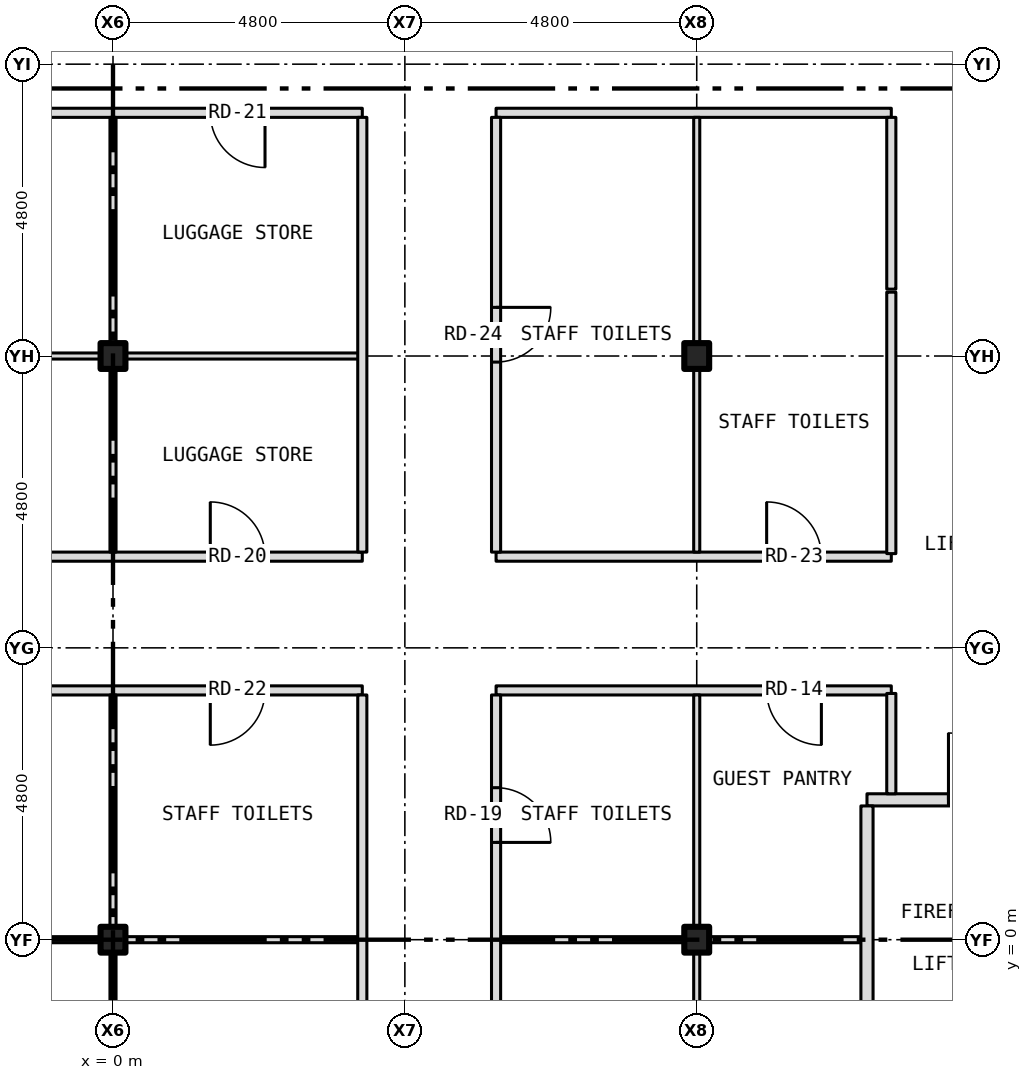
"""IFC4 building model, lengths in metres.
Left out: names, types, materials, properties, quantities, classifications, styles, units other than length and angle.
Written with IfcOpenShell. Run it as: python <this file> out.ifc"""

import sys

from ifc_helpers import new_model, si_unit, direction, frame, frame_2d, origin, origin_2d, place, context, subcontext, project, spatial, rectangle, i_section, extrude, element, fill, save


model = new_model("IFC4")
c1 = context("Model", 3, precision=1e-05, world=origin(), true_north=direction((0.0, 1.0)))
c2 = subcontext(c1, "Body", "Model", "MODEL_VIEW")
j1 = project(units=[si_unit("LENGTHUNIT", "METRE"), si_unit("PLANEANGLEUNIT", "RADIAN")], contexts=[c1])
p1 = place(None, origin())
s1 = spatial("IfcSite", under=j1, at=p1, CompositionType="ELEMENT")
p2 = place(p1, origin())
s2 = spatial("IfcBuilding", under=s1, at=p2, CompositionType="ELEMENT")
p3 = place(p2, frame((0.0, 0.0, 53.0)))
s3 = spatial("IfcBuildingStorey", under=s2, at=p3, CompositionType="ELEMENT", Elevation=53.0)
for number, where, z_axis, x_axis in (
    (1, (0.0, 0.0, -0.15), (0.0, 0.0, 1.0), (1.0, 0.0, 0.0)),
    (2, (0.0, 9.6, -0.15), (0.0, 0.0, 1.0), (1.0, 0.0, 0.0)),
    (3, (9.6, 0.0, -0.15), (0.0, 0.0, 1.0), (1.0, 0.0, 0.0)),
    (4, (9.6, 9.6, -0.15), (0.0, 0.0, 1.0), (1.0, 0.0, 0.0)),
):
    element("IfcColumn", number, at=place(p3, frame(where, z_axis=z_axis, x_axis=x_axis)), inside=s3, PredefinedType="COLUMN", context=c2, shape_type="SweptSolid", body=[
        extrude(i_section(OverallWidth=0.409, OverallDepth=0.424, WebThickness=0.033, FlangeThickness=0.052, at=origin_2d()), origin(), (0.0, 0.0, 1.0), 3.5),
    ])
p4 = place(p3, frame((-9.396, 0.0, 0.0), z_axis=(0.0, 0.0, 1.0), x_axis=(1.0, 0.0, 0.0)))
e5 = element("IfcWall", 5, at=p4, inside=s3, PredefinedType="PARTITIONING", context=c2, shape_type="SweptSolid", body=[
    extrude(rectangle(XDim=9.192, YDim=0.1, at=frame_2d((4.596, 0.0))), origin(), (0.0, 0.0, 1.0), 2.728),
])
p5 = place(p3, frame((-0.204, 0.0, 0.0), z_axis=(0.0, 0.0, 1.0), x_axis=(1.0, 0.0, 0.0)))
e6 = element("IfcWall", 6, at=p5, inside=s3, PredefinedType="PARTITIONING", context=c2, shape_type="SweptSolid", body=[
    extrude(rectangle(XDim=0.408, YDim=0.1, at=frame_2d((0.204, 0.0))), origin(), (0.0, 0.0, 1.0), 3.35),
])
p6 = place(p3, frame((0.204, 0.0, 0.0), z_axis=(0.0, 0.0, 1.0), x_axis=(1.0, 0.0, 0.0)))
e7 = element("IfcWall", 7, at=p6, inside=s3, PredefinedType="PARTITIONING", context=c2, shape_type="SweptSolid", body=[
    extrude(rectangle(XDim=3.896, YDim=0.1, at=frame_2d((1.948, 0.0))), origin(), (0.0, 0.0, 1.0), 2.728),
])
p7 = place(p3, frame((6.3, 0.0, 0.0), z_axis=(0.0, 0.0, 1.0), x_axis=(1.0, 0.0, 0.0)))
e8 = element("IfcWall", 8, at=p7, inside=s3, PredefinedType="PARTITIONING", context=c2, shape_type="SweptSolid", body=[
    extrude(rectangle(XDim=3.096, YDim=0.1, at=frame_2d((1.548, 0.0))), origin(), (0.0, 0.0, 1.0), 2.728),
])
p8 = place(p3, frame((9.396, 0.0, 0.0), z_axis=(0.0, 0.0, 1.0), x_axis=(1.0, 0.0, 0.0)))
e9 = element("IfcWall", 9, at=p8, inside=s3, PredefinedType="PARTITIONING", context=c2, shape_type="SweptSolid", body=[
    extrude(rectangle(XDim=0.408, YDim=0.1, at=frame_2d((0.204, 0.0))), origin(), (0.0, 0.0, 1.0), 3.35),
])
p9 = place(p3, frame((9.804, 0.0, 0.0), z_axis=(0.0, 0.0, 1.0), x_axis=(1.0, 0.0, 0.0)))
e10 = element("IfcWall", 10, at=p9, inside=s3, PredefinedType="PARTITIONING", context=c2, shape_type="SweptSolid", body=[
    extrude(rectangle(XDim=2.596, YDim=0.1, at=frame_2d((1.298, 0.0))), origin(), (0.0, 0.0, 1.0), 2.728),
])
p10 = place(p3, frame((12.4, 2.3, 0.0), z_axis=(0.0, 0.0, 1.0), x_axis=(1.0, 0.0, 0.0)))
e11 = element("IfcWall", 11, at=p10, inside=s3, PredefinedType="PARTITIONING", context=c2, shape_type="SweptSolid", body=[
    extrude(rectangle(XDim=3.28, YDim=0.2, at=frame_2d((1.64, 0.0))), origin(), (0.0, 0.0, 1.0), 3.35),
])
p11 = place(p10, frame((1.34, 0.0, 0.0)))
e12 = element("IfcOpeningElement", 12, at=p11, cuts=e11, PredefinedType="OPENING", context=c2, shape_type="SweptSolid", body=[
    extrude(rectangle(XDim=1.1, YDim=2.1, at=frame_2d((0.55, 1.05))), frame((0.0, 0.112, 0.0), z_axis=(0.0, -1.0, 0.0), x_axis=(1.0, 0.0, 0.0)), (0.0, 0.0, 1.0), 0.224),
])
p12 = place(p3, frame((-12.8, 4.1, 0.0), z_axis=(0.0, 0.0, 1.0), x_axis=(1.0, 0.0, 0.0)))
e13 = element("IfcWall", 13, at=p12, inside=s3, PredefinedType="PARTITIONING", context=c2, shape_type="SweptSolid", body=[
    extrude(rectangle(XDim=16.9, YDim=0.15, at=frame_2d((8.45, 0.0))), origin(), (0.0, 0.0, 1.0), 3.35),
])
p13 = place(p12, frame((1.15, 0.0, 0.0)))
e14 = element("IfcOpeningElement", 14, at=p13, cuts=e13, PredefinedType="OPENING", context=c2, shape_type="SweptSolid", body=[
    extrude(rectangle(XDim=0.9, YDim=2.1, at=frame_2d((0.45, 1.05))), frame((0.0, 0.087, 0.0), z_axis=(0.0, -1.0, 0.0), x_axis=(1.0, 0.0, 0.0)), (0.0, 0.0, 1.0), 0.174),
])
p14 = place(p12, frame((14.4, 0.0, 0.0)))
e15 = element("IfcOpeningElement", 15, at=p14, cuts=e13, PredefinedType="OPENING", context=c2, shape_type="SweptSolid", body=[
    extrude(rectangle(XDim=0.9, YDim=2.1, at=frame_2d((0.45, 1.05))), frame((0.0, 0.087, 0.0), z_axis=(0.0, -1.0, 0.0), x_axis=(1.0, 0.0, 0.0)), (0.0, 0.0, 1.0), 0.174),
])
p15 = place(p12, frame((7.55, 0.0, 0.0)))
e16 = element("IfcOpeningElement", 16, at=p15, cuts=e13, PredefinedType="OPENING", context=c2, shape_type="SweptSolid", body=[
    extrude(rectangle(XDim=0.9, YDim=2.1, at=frame_2d((0.45, 1.05))), frame((0.0, 0.087, 0.0), z_axis=(0.0, -1.0, 0.0), x_axis=(1.0, 0.0, 0.0)), (0.0, 0.0, 1.0), 0.174),
])
p16 = place(p3, frame((6.3, 4.1, 0.0), z_axis=(0.0, 0.0, 1.0), x_axis=(1.0, 0.0, 0.0)))
e17 = element("IfcWall", 17, at=p16, inside=s3, PredefinedType="PARTITIONING", context=c2, shape_type="SweptSolid", body=[
    extrude(rectangle(XDim=6.5, YDim=0.15, at=frame_2d((3.25, 0.0))), origin(), (0.0, 0.0, 1.0), 3.35),
])
p17 = place(p16, frame((4.45, 0.0, 0.0)))
e18 = element("IfcOpeningElement", 18, at=p17, cuts=e17, PredefinedType="OPENING", context=c2, shape_type="SweptSolid", body=[
    extrude(rectangle(XDim=0.9, YDim=2.1, at=frame_2d((0.45, 1.05))), frame((0.0, 0.087, 0.0), z_axis=(0.0, -1.0, 0.0), x_axis=(1.0, 0.0, 0.0)), (0.0, 0.0, 1.0), 0.174),
])
p18 = place(p3, frame((-12.8, 6.3, 0.0), z_axis=(0.0, 0.0, 1.0), x_axis=(1.0, 0.0, 0.0)))
e19 = element("IfcWall", 19, at=p18, inside=s3, PredefinedType="PARTITIONING", context=c2, shape_type="SweptSolid", body=[
    extrude(rectangle(XDim=16.9, YDim=0.15, at=frame_2d((8.45, 0.0))), origin(), (0.0, 0.0, 1.0), 3.35),
])
p19 = place(p18, frame((14.4, 0.0, 0.0)))
e20 = element("IfcOpeningElement", 20, at=p19, cuts=e19, PredefinedType="OPENING", context=c2, shape_type="SweptSolid", body=[
    extrude(rectangle(XDim=0.9, YDim=2.1, at=frame_2d((0.45, 1.05))), frame((0.0, 0.087, 0.0), z_axis=(0.0, -1.0, 0.0), x_axis=(1.0, 0.0, 0.0)), (0.0, 0.0, 1.0), 0.174),
])
p20 = place(p18, frame((7.55, 0.0, 0.0)))
e21 = element("IfcOpeningElement", 21, at=p20, cuts=e19, PredefinedType="OPENING", context=c2, shape_type="SweptSolid", body=[
    extrude(rectangle(XDim=0.9, YDim=2.1, at=frame_2d((0.45, 1.05))), frame((0.0, 0.087, 0.0), z_axis=(0.0, -1.0, 0.0), x_axis=(1.0, 0.0, 0.0)), (0.0, 0.0, 1.0), 0.174),
])
p21 = place(p3, frame((6.3, 6.3, 0.0), z_axis=(0.0, 0.0, 1.0), x_axis=(1.0, 0.0, 0.0)))
e22 = element("IfcWall", 22, at=p21, inside=s3, PredefinedType="PARTITIONING", context=c2, shape_type="SweptSolid", body=[
    extrude(rectangle(XDim=6.5, YDim=0.15, at=frame_2d((3.25, 0.0))), origin(), (0.0, 0.0, 1.0), 3.35),
])
p22 = place(p21, frame((4.45, 0.0, 0.0)))
e23 = element("IfcOpeningElement", 23, at=p22, cuts=e22, PredefinedType="OPENING", context=c2, shape_type="SweptSolid", body=[
    extrude(rectangle(XDim=0.9, YDim=2.1, at=frame_2d((0.45, 1.05))), frame((0.0, 0.087, 0.0), z_axis=(0.0, -1.0, 0.0), x_axis=(1.0, 0.0, 0.0)), (0.0, 0.0, 1.0), 0.174),
])
p23 = place(p3, frame((-9.396, 9.6, 0.0), z_axis=(0.0, 0.0, 1.0), x_axis=(1.0, 0.0, 0.0)))
e24 = element("IfcWall", 24, at=p23, inside=s3, PredefinedType="PARTITIONING", context=c2, shape_type="SweptSolid", body=[
    extrude(rectangle(XDim=9.192, YDim=0.1, at=frame_2d((4.596, 0.0))), origin(), (0.0, 0.0, 1.0), 2.728),
])
p24 = place(p3, frame((-0.204, 9.6, 0.0), z_axis=(0.0, 0.0, 1.0), x_axis=(1.0, 0.0, 0.0)))
e25 = element("IfcWall", 25, at=p24, inside=s3, PredefinedType="PARTITIONING", context=c2, shape_type="SweptSolid", body=[
    extrude(rectangle(XDim=0.408, YDim=0.1, at=frame_2d((0.204, 0.0))), origin(), (0.0, 0.0, 1.0), 3.35),
])
p25 = place(p3, frame((0.204, 9.6, 0.0), z_axis=(0.0, 0.0, 1.0), x_axis=(1.0, 0.0, 0.0)))
e26 = element("IfcWall", 26, at=p25, inside=s3, PredefinedType="PARTITIONING", context=c2, shape_type="SweptSolid", body=[
    extrude(rectangle(XDim=3.896, YDim=0.1, at=frame_2d((1.948, 0.0))), origin(), (0.0, 0.0, 1.0), 2.728),
])
p26 = place(p3, frame((-12.8, 13.6, 0.0), z_axis=(0.0, 0.0, 1.0), x_axis=(1.0, 0.0, 0.0)))
e27 = element("IfcWall", 27, at=p26, inside=s3, PredefinedType="PARTITIONING", context=c2, shape_type="SweptSolid", body=[
    extrude(rectangle(XDim=16.9, YDim=0.15, at=frame_2d((8.45, 0.0))), origin(), (0.0, 0.0, 1.0), 3.35),
])
p27 = place(p26, frame((1.15, 0.0, 0.0)))
e28 = element("IfcOpeningElement", 28, at=p27, cuts=e27, PredefinedType="OPENING", context=c2, shape_type="SweptSolid", body=[
    extrude(rectangle(XDim=0.9, YDim=2.1, at=frame_2d((0.45, 1.05))), frame((0.0, 0.087, 0.0), z_axis=(0.0, -1.0, 0.0), x_axis=(1.0, 0.0, 0.0)), (0.0, 0.0, 1.0), 0.174),
])
p28 = place(p26, frame((14.4, 0.0, 0.0)))
e29 = element("IfcOpeningElement", 29, at=p28, cuts=e27, PredefinedType="OPENING", context=c2, shape_type="SweptSolid", body=[
    extrude(rectangle(XDim=0.9, YDim=2.1, at=frame_2d((0.45, 1.05))), frame((0.0, 0.087, 0.0), z_axis=(0.0, -1.0, 0.0), x_axis=(1.0, 0.0, 0.0)), (0.0, 0.0, 1.0), 0.174),
])
p29 = place(p26, frame((7.55, 0.0, 0.0)))
e30 = element("IfcOpeningElement", 30, at=p29, cuts=e27, PredefinedType="OPENING", context=c2, shape_type="SweptSolid", body=[
    extrude(rectangle(XDim=0.9, YDim=2.1, at=frame_2d((0.45, 1.05))), frame((0.0, 0.087, 0.0), z_axis=(0.0, -1.0, 0.0), x_axis=(1.0, 0.0, 0.0)), (0.0, 0.0, 1.0), 0.174),
])
p30 = place(p3, frame((6.3, 13.6, 0.0), z_axis=(0.0, 0.0, 1.0), x_axis=(1.0, 0.0, 0.0)))
e31 = element("IfcWall", 31, at=p30, inside=s3, PredefinedType="PARTITIONING", context=c2, shape_type="SweptSolid", body=[
    extrude(rectangle(XDim=6.5, YDim=0.15, at=frame_2d((3.25, 0.0))), origin(), (0.0, 0.0, 1.0), 3.35),
])
p31 = place(p3, frame((0.0, -9.55, 0.0), z_axis=(0.0, 0.0, 1.0), x_axis=(0.0, 1.0, 0.0)))
e32 = element("IfcWall", 32, at=p31, inside=s3, PredefinedType="PARTITIONING", context=c2, shape_type="SweptSolid", body=[
    extrude(rectangle(XDim=9.5, YDim=0.1, at=frame_2d((4.75, 0.0))), origin(), (0.0, 0.0, 1.0), 2.728),
])
p32 = place(p3, frame((0.0, 0.05, 0.0), z_axis=(0.0, 0.0, 1.0), x_axis=(0.0, 1.0, 0.0)))
e33 = element("IfcWall", 33, at=p32, inside=s3, PredefinedType="PARTITIONING", context=c2, shape_type="SweptSolid", body=[
    extrude(rectangle(XDim=3.975, YDim=0.1, at=frame_2d((1.987, 0.0))), origin(), (0.0, 0.0, 1.0), 2.728),
])
p33 = place(p3, frame((0.0, 6.375, 0.0), z_axis=(0.0, 0.0, 1.0), x_axis=(0.0, 1.0, 0.0)))
e34 = element("IfcWall", 34, at=p33, inside=s3, PredefinedType="PARTITIONING", context=c2, shape_type="SweptSolid", body=[
    extrude(rectangle(XDim=3.175, YDim=0.1, at=frame_2d((1.587, 0.0))), origin(), (0.0, 0.0, 1.0), 2.728),
])
p34 = place(p3, frame((0.0, 9.65, 0.0), z_axis=(0.0, 0.0, 1.0), x_axis=(0.0, 1.0, 0.0)))
e35 = element("IfcWall", 35, at=p34, inside=s3, PredefinedType="PARTITIONING", context=c2, shape_type="SweptSolid", body=[
    extrude(rectangle(XDim=3.875, YDim=0.1, at=frame_2d((1.938, 0.0))), origin(), (0.0, 0.0, 1.0), 2.728),
])
p35 = place(p3, frame((4.1, -13.525, 0.0), z_axis=(0.0, 0.0, 1.0), x_axis=(0.0, 1.0, 0.0)))
e36 = element("IfcWall", 36, at=p35, inside=s3, PredefinedType="PARTITIONING", context=c2, shape_type="SweptSolid", body=[
    extrude(rectangle(XDim=17.55, YDim=0.15, at=frame_2d((8.775, 0.0))), origin(), (0.0, 0.0, 1.0), 3.35),
])
p36 = place(p35, frame((1.475, 0.0, 0.0)))
e37 = element("IfcOpeningElement", 37, at=p36, cuts=e36, PredefinedType="OPENING", context=c2, shape_type="SweptSolid", body=[
    extrude(rectangle(XDim=0.9, YDim=2.1, at=frame_2d((0.45, 1.05))), frame((0.0, 0.087, 0.0), z_axis=(0.0, -1.0, 0.0), x_axis=(1.0, 0.0, 0.0)), (0.0, 0.0, 1.0), 0.174),
])
p37 = place(p35, frame((8.275, 0.0, 0.0)))
e38 = element("IfcOpeningElement", 38, at=p37, cuts=e36, PredefinedType="OPENING", context=c2, shape_type="SweptSolid", body=[
    extrude(rectangle(XDim=0.9, YDim=2.1, at=frame_2d((0.45, 1.05))), frame((0.0, 0.087, 0.0), z_axis=(0.0, -1.0, 0.0), x_axis=(1.0, 0.0, 0.0)), (0.0, 0.0, 1.0), 0.174),
])
p38 = place(p3, frame((4.1, 6.375, 0.0), z_axis=(0.0, 0.0, 1.0), x_axis=(0.0, 1.0, 0.0)))
e39 = element("IfcWall", 39, at=p38, inside=s3, PredefinedType="PARTITIONING", context=c2, shape_type="SweptSolid", body=[
    extrude(rectangle(XDim=7.15, YDim=0.15, at=frame_2d((3.575, 0.0))), origin(), (0.0, 0.0, 1.0), 3.35),
])
p39 = place(p3, frame((6.3, -13.525, 0.0), z_axis=(0.0, 0.0, 1.0), x_axis=(0.0, 1.0, 0.0)))
e40 = element("IfcWall", 40, at=p39, inside=s3, PredefinedType="PARTITIONING", context=c2, shape_type="SweptSolid", body=[
    extrude(rectangle(XDim=17.55, YDim=0.15, at=frame_2d((8.775, 0.0))), origin(), (0.0, 0.0, 1.0), 3.35),
])
p40 = place(p39, frame((1.475, 0.0, 0.0)))
e41 = element("IfcOpeningElement", 41, at=p40, cuts=e40, PredefinedType="OPENING", context=c2, shape_type="SweptSolid", body=[
    extrude(rectangle(XDim=0.9, YDim=2.1, at=frame_2d((0.45, 1.05))), frame((0.0, 0.087, 0.0), z_axis=(0.0, -1.0, 0.0), x_axis=(1.0, 0.0, 0.0)), (0.0, 0.0, 1.0), 0.174),
])
p41 = place(p39, frame((15.125, 0.0, 0.0)))
e42 = element("IfcOpeningElement", 42, at=p41, cuts=e40, PredefinedType="OPENING", context=c2, shape_type="SweptSolid", body=[
    extrude(rectangle(XDim=0.9, YDim=2.1, at=frame_2d((0.45, 1.05))), frame((0.0, 0.087, 0.0), z_axis=(0.0, -1.0, 0.0), x_axis=(1.0, 0.0, 0.0)), (0.0, 0.0, 1.0), 0.174),
])
p42 = place(p39, frame((8.275, 0.0, 0.0)))
e43 = element("IfcOpeningElement", 43, at=p42, cuts=e40, PredefinedType="OPENING", context=c2, shape_type="SweptSolid", body=[
    extrude(rectangle(XDim=0.9, YDim=2.1, at=frame_2d((0.45, 1.05))), frame((0.0, 0.087, 0.0), z_axis=(0.0, -1.0, 0.0), x_axis=(1.0, 0.0, 0.0)), (0.0, 0.0, 1.0), 0.174),
])
p43 = place(p3, frame((6.3, 6.375, 0.0), z_axis=(0.0, 0.0, 1.0), x_axis=(0.0, 1.0, 0.0)))
e44 = element("IfcWall", 44, at=p43, inside=s3, PredefinedType="PARTITIONING", context=c2, shape_type="SweptSolid", body=[
    extrude(rectangle(XDim=7.15, YDim=0.15, at=frame_2d((3.575, 0.0))), origin(), (0.0, 0.0, 1.0), 3.35),
])
p44 = place(p43, frame((3.125, 0.0, 0.0)))
e45 = element("IfcOpeningElement", 45, at=p44, cuts=e44, PredefinedType="OPENING", context=c2, shape_type="SweptSolid", body=[
    extrude(rectangle(XDim=0.9, YDim=2.1, at=frame_2d((0.45, 1.05))), frame((0.0, 0.087, 0.0), z_axis=(0.0, -1.0, 0.0), x_axis=(1.0, 0.0, 0.0)), (0.0, 0.0, 1.0), 0.174),
])
p45 = place(p3, frame((9.6, -9.55, 0.0), z_axis=(0.0, 0.0, 1.0), x_axis=(0.0, 1.0, 0.0)))
e46 = element("IfcWall", 46, at=p45, inside=s3, PredefinedType="PARTITIONING", context=c2, shape_type="SweptSolid", body=[
    extrude(rectangle(XDim=9.5, YDim=0.1, at=frame_2d((4.75, 0.0))), origin(), (0.0, 0.0, 1.0), 2.728),
])
p46 = place(p3, frame((9.6, 0.05, 0.0), z_axis=(0.0, 0.0, 1.0), x_axis=(0.0, 1.0, 0.0)))
e47 = element("IfcWall", 47, at=p46, inside=s3, PredefinedType="PARTITIONING", context=c2, shape_type="SweptSolid", body=[
    extrude(rectangle(XDim=3.975, YDim=0.1, at=frame_2d((1.987, 0.0))), origin(), (0.0, 0.0, 1.0), 2.728),
])
p47 = place(p3, frame((9.6, 6.375, 0.0), z_axis=(0.0, 0.0, 1.0), x_axis=(0.0, 1.0, 0.0)))
e48 = element("IfcWall", 48, at=p47, inside=s3, PredefinedType="PARTITIONING", context=c2, shape_type="SweptSolid", body=[
    extrude(rectangle(XDim=3.021, YDim=0.1, at=frame_2d((1.51, 0.0))), origin(), (0.0, 0.0, 1.0), 2.728),
])
p48 = place(p3, frame((9.6, 9.396, 0.0), z_axis=(0.0, 0.0, 1.0), x_axis=(0.0, 1.0, 0.0)))
e49 = element("IfcWall", 49, at=p48, inside=s3, PredefinedType="PARTITIONING", context=c2, shape_type="SweptSolid", body=[
    extrude(rectangle(XDim=0.408, YDim=0.1, at=frame_2d((0.204, 0.0))), origin(), (0.0, 0.0, 1.0), 3.35),
])
p49 = place(p3, frame((9.6, 9.804, 0.0), z_axis=(0.0, 0.0, 1.0), x_axis=(0.0, 1.0, 0.0)))
e50 = element("IfcWall", 50, at=p49, inside=s3, PredefinedType="PARTITIONING", context=c2, shape_type="SweptSolid", body=[
    extrude(rectangle(XDim=3.721, YDim=0.1, at=frame_2d((1.86, 0.0))), origin(), (0.0, 0.0, 1.0), 2.728),
])
p50 = place(p3, frame((12.4, -1.8, 0.0), z_axis=(0.0, 0.0, 1.0), x_axis=(0.0, 1.0, 0.0)))
e51 = element("IfcWall", 51, at=p50, inside=s3, PredefinedType="PARTITIONING", context=c2, shape_type="SweptSolid", body=[
    extrude(rectangle(XDim=4.0, YDim=0.2, at=frame_2d((2.0, 0.0))), origin(), (0.0, 0.0, 1.0), 3.35),
])
p51 = place(p3, frame((12.8, 2.4, 0.0), z_axis=(0.0, 0.0, 1.0), x_axis=(0.0, 1.0, 0.0)))
e52 = element("IfcWall", 52, at=p51, inside=s3, PredefinedType="PARTITIONING", context=c2, shape_type="SweptSolid", body=[
    extrude(rectangle(XDim=1.65, YDim=0.15, at=frame_2d((0.825, 0.0))), origin(), (0.0, 0.0, 1.0), 3.35),
])
p52 = place(p3, frame((12.8, 6.35, 0.0), z_axis=(0.0, 0.0, 1.0), x_axis=(0.0, 1.0, 0.0)))
e53 = element("IfcWall", 53, at=p52, inside=s3, PredefinedType="PARTITIONING", context=c2, shape_type="SweptSolid", body=[
    extrude(rectangle(XDim=4.3, YDim=0.15, at=frame_2d((2.15, 0.0))), origin(), (0.0, 0.0, 1.0), 3.35),
])
p53 = place(p3, frame((12.8, 10.7, 0.0), z_axis=(0.0, 0.0, 1.0), x_axis=(0.0, 1.0, 0.0)))
e54 = element("IfcWall", 54, at=p53, inside=s3, PredefinedType="PARTITIONING", context=c2, shape_type="SweptSolid", body=[
    extrude(rectangle(XDim=2.825, YDim=0.15, at=frame_2d((1.413, 0.0))), origin(), (0.0, 0.0, 1.0), 3.35),
])
p54 = place(p11, origin())
e55 = element("IfcDoor", 55, at=p54, inside=s3, OperationType="SINGLE_SWING_LEFT", PredefinedType="DOOR", context=c2, shape_type="SweptSolid", body=[
    extrude(rectangle(XDim=1.1, YDim=2.1, at=frame_2d((0.55, 1.05))), frame((0.0, 0.025, 0.0), z_axis=(0.0, -1.0, 0.0), x_axis=(1.0, 0.0, 0.0)), (0.0, 0.0, 1.0), 0.05),
])
fill(e12, e55)
p55 = place(p17, origin())
e56 = element("IfcDoor", 56, at=p55, inside=s3, OperationType="SINGLE_SWING_RIGHT", PredefinedType="DOOR", context=c2, shape_type="SweptSolid", body=[
    extrude(rectangle(XDim=0.9, YDim=2.1, at=frame_2d((0.45, 1.05))), frame((0.0, 0.025, 0.0), z_axis=(0.0, -1.0, 0.0), x_axis=(1.0, 0.0, 0.0)), (0.0, 0.0, 1.0), 0.05),
])
fill(e18, e56)
p56 = place(p41, origin())
e57 = element("IfcDoor", 57, at=p56, inside=s3, OperationType="SINGLE_SWING_LEFT", PredefinedType="DOOR", context=c2, shape_type="SweptSolid", body=[
    extrude(rectangle(XDim=0.9, YDim=2.1, at=frame_2d((0.45, 1.05))), frame((0.0, 0.025, 0.0), z_axis=(0.0, -1.0, 0.0), x_axis=(1.0, 0.0, 0.0)), (0.0, 0.0, 1.0), 0.05),
])
fill(e42, e57)
p57 = place(p19, origin())
e58 = element("IfcDoor", 58, at=p57, inside=s3, OperationType="SINGLE_SWING_LEFT", PredefinedType="DOOR", context=c2, shape_type="SweptSolid", body=[
    extrude(rectangle(XDim=0.9, YDim=2.1, at=frame_2d((0.45, 1.05))), frame((0.0, 0.025, 0.0), z_axis=(0.0, -1.0, 0.0), x_axis=(1.0, 0.0, 0.0)), (0.0, 0.0, 1.0), 0.05),
])
fill(e20, e58)
p58 = place(p28, origin())
e59 = element("IfcDoor", 59, at=p58, inside=s3, OperationType="SINGLE_SWING_RIGHT", PredefinedType="DOOR", context=c2, shape_type="SweptSolid", body=[
    extrude(rectangle(XDim=0.9, YDim=2.1, at=frame_2d((0.45, 1.05))), frame((0.0, 0.025, 0.0), z_axis=(0.0, -1.0, 0.0), x_axis=(1.0, 0.0, 0.0)), (0.0, 0.0, 1.0), 0.05),
])
fill(e29, e59)
p59 = place(p14, origin())
e60 = element("IfcDoor", 60, at=p59, inside=s3, OperationType="SINGLE_SWING_LEFT", PredefinedType="DOOR", context=c2, shape_type="SweptSolid", body=[
    extrude(rectangle(XDim=0.9, YDim=2.1, at=frame_2d((0.45, 1.05))), frame((0.0, 0.025, 0.0), z_axis=(0.0, -1.0, 0.0), x_axis=(1.0, 0.0, 0.0)), (0.0, 0.0, 1.0), 0.05),
])
fill(e15, e60)
p60 = place(p22, origin())
e61 = element("IfcDoor", 61, at=p60, inside=s3, OperationType="SINGLE_SWING_LEFT", PredefinedType="DOOR", context=c2, shape_type="SweptSolid", body=[
    extrude(rectangle(XDim=0.9, YDim=2.1, at=frame_2d((0.45, 1.05))), frame((0.0, 0.025, 0.0), z_axis=(0.0, -1.0, 0.0), x_axis=(1.0, 0.0, 0.0)), (0.0, 0.0, 1.0), 0.05),
])
fill(e23, e61)
p61 = place(p44, origin())
e62 = element("IfcDoor", 62, at=p61, inside=s3, OperationType="SINGLE_SWING_RIGHT", PredefinedType="DOOR", context=c2, shape_type="SweptSolid", body=[
    extrude(rectangle(XDim=0.9, YDim=2.1, at=frame_2d((0.45, 1.05))), frame((0.0, 0.025, 0.0), z_axis=(0.0, -1.0, 0.0), x_axis=(1.0, 0.0, 0.0)), (0.0, 0.0, 1.0), 0.05),
])
fill(e45, e62)
save(model, sys.argv[1])
